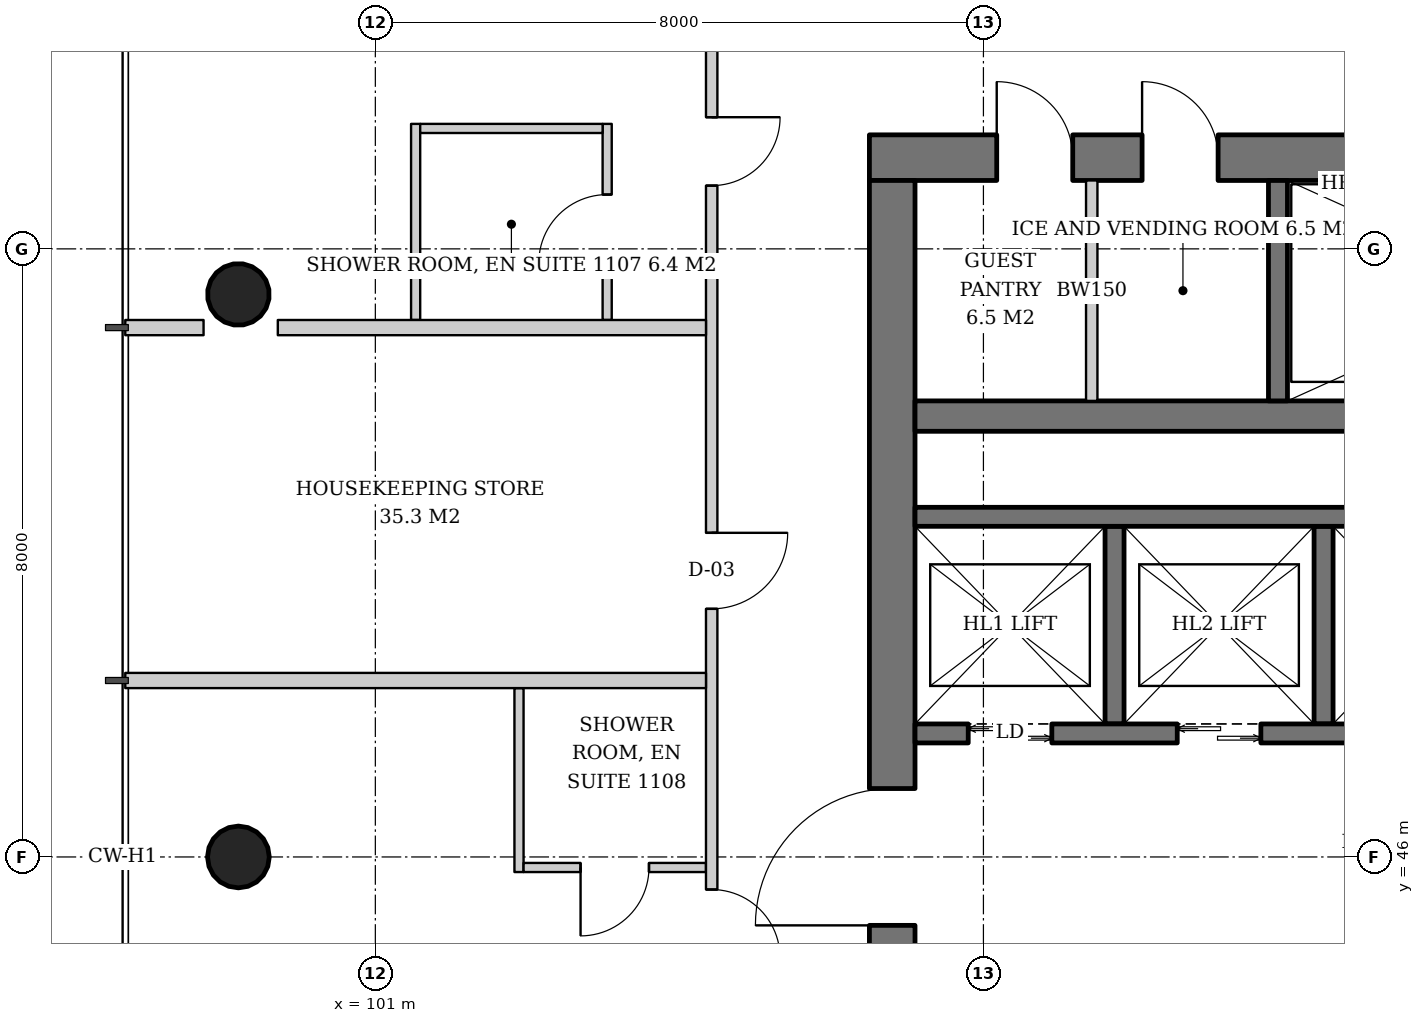
"""IFC4 building model, lengths in metres.
Left out: names, types, materials, properties, quantities, classifications, styles, units other than length and angle.
Written with IfcOpenShell. Run it as: python <this file> out.ifc"""

import sys

from ifc_helpers import new_model, si_unit, direction, frame, frame_2d, origin, origin_2d, place, context, subcontext, project, spatial, rectangle, hollow_circle, extrude, element, fill, save


model = new_model("IFC4")
c1 = context("Model", 3, precision=1e-05, world=origin(), true_north=direction((0.0, 1.0)))
c2 = subcontext(c1, "Body", "Model", "MODEL_VIEW")
j1 = project(units=[si_unit("LENGTHUNIT", "METRE"), si_unit("PLANEANGLEUNIT", "RADIAN")], contexts=[c1])
p1 = place(None, origin())
s1 = spatial("IfcSite", under=j1, at=p1, CompositionType="ELEMENT")
p2 = place(p1, origin())
s2 = spatial("IfcBuilding", under=s1, at=p2, CompositionType="ELEMENT")
p3 = place(p2, frame((0.0, 0.0, 47.6)))
s3 = spatial("IfcBuildingStorey", under=s2, at=p3, CompositionType="ELEMENT", Elevation=47.6)
p4 = place(p3, frame((99.146, 53.427, 0.0), z_axis=(0.043062285527, -0.021563230905, 0.998839660125), x_axis=(0.44774654769, 0.894160516368, 0.0)))
e1 = element("IfcColumn", 1, at=p4, inside=s3, PredefinedType="COLUMN", context=c2, shape_type="SweptSolid", body=[
    extrude(hollow_circle(Radius=0.406, WallThickness=0.03, at=origin_2d()), origin(), (0.0, 0.0, 1.0), 3.804),
])
p5 = place(p3, frame((99.146, 46.0, 0.0), z_axis=(0.043072300418, 0.0, 0.999071957837), x_axis=(0.0, 1.0, 0.0)))
e2 = element("IfcColumn", 2, at=p5, inside=s3, PredefinedType="COLUMN", context=c2, shape_type="SweptSolid", body=[
    extrude(hollow_circle(Radius=0.406, WallThickness=0.03, at=origin_2d()), origin(), (0.0, 0.0, 1.0), 3.803),
])
p6 = place(p3, frame((107.5, 55.2, 0.0), z_axis=(0.0, 0.0, 1.0), x_axis=(1.0, 0.0, 0.0)))
e3 = element("IfcWall", 3, at=p6, inside=s3, PredefinedType="SHEAR", context=c2, shape_type="SweptSolid", body=[
    extrude(rectangle(XDim=19.0, YDim=0.6, at=frame_2d((9.5, 0.0))), origin(), (0.0, 0.0, 1.0), 3.8),
])
p7 = place(p6, frame((14.14, 0.0, 0.0)))
e4 = element("IfcOpeningElement", 4, at=p7, cuts=e3, PredefinedType="OPENING", context=c2, shape_type="SweptSolid", body=[
    extrude(rectangle(XDim=1.0, YDim=2.1, at=frame_2d((0.5, 1.05))), frame((0.0, 0.31, 0.0), z_axis=(0.0, -1.0, 0.0), x_axis=(1.0, 0.0, 0.0)), (0.0, 0.0, 1.0), 0.62),
])
p8 = place(p6, frame((1.675, 0.0, 0.0)))
e5 = element("IfcOpeningElement", 5, at=p8, cuts=e3, PredefinedType="OPENING", context=c2, shape_type="SweptSolid", body=[
    extrude(rectangle(XDim=1.0, YDim=2.1, at=frame_2d((0.5, 1.05))), frame((0.0, 0.31, 0.0), z_axis=(0.0, -1.0, 0.0), x_axis=(1.0, 0.0, 0.0)), (0.0, 0.0, 1.0), 0.62),
])
p9 = place(p6, frame((3.587, 0.0, 0.0)))
e6 = element("IfcOpeningElement", 6, at=p9, cuts=e3, PredefinedType="OPENING", context=c2, shape_type="SweptSolid", body=[
    extrude(rectangle(XDim=1.0, YDim=2.1, at=frame_2d((0.5, 1.05))), frame((0.0, 0.31, 0.0), z_axis=(0.0, -1.0, 0.0), x_axis=(1.0, 0.0, 0.0)), (0.0, 0.0, 1.0), 0.62),
])
p10 = place(p3, frame((107.8, 37.1, 0.0), z_axis=(0.0, 0.0, 1.0), x_axis=(0.0, 1.0, 0.0)))
e7 = element("IfcWall", 7, at=p10, inside=s3, PredefinedType="SHEAR", context=c2, shape_type="SweptSolid", body=[
    extrude(rectangle(XDim=17.8, YDim=0.6, at=frame_2d((8.9, 0.0))), origin(), (0.0, 0.0, 1.0), 3.8),
])
p11 = place(p10, frame((8.0, 0.0, 0.0)))
e8 = element("IfcOpeningElement", 8, at=p11, cuts=e7, PredefinedType="OPENING", context=c2, shape_type="SweptSolid", body=[
    extrude(rectangle(XDim=1.8, YDim=2.4, at=frame_2d((0.9, 1.2))), frame((0.0, 0.31, 0.0), z_axis=(0.0, -1.0, 0.0), x_axis=(1.0, 0.0, 0.0)), (0.0, 0.0, 1.0), 0.62),
])
p12 = place(p3, frame((108.1, 51.8, 0.0), z_axis=(0.0, 0.0, 1.0), x_axis=(1.0, 0.0, 0.0)))
e9 = element("IfcWall", 9, at=p12, inside=s3, PredefinedType="SHEAR", context=c2, shape_type="SweptSolid", body=[
    extrude(rectangle(XDim=17.8, YDim=0.4, at=frame_2d((8.9, 0.0))), origin(), (0.0, 0.0, 1.0), 3.8),
])
p13 = place(p3, frame((112.875, 52.0, 0.0), z_axis=(0.0, 0.0, 1.0), x_axis=(0.0, 1.0, 0.0)))
e10 = element("IfcWall", 10, at=p13, inside=s3, PredefinedType="SHEAR", context=c2, shape_type="SweptSolid", body=[
    extrude(rectangle(XDim=2.9, YDim=0.25, at=frame_2d((1.45, 0.0))), origin(), (0.0, 0.0, 1.0), 3.8),
])
for number, where, z_axis, x_axis in (
    (11, (110.725, 47.75, 0.0), (0.0, 0.0, 1.0), (0.0, 1.0, 0.0)),
    (12, (113.475, 47.75, 0.0), (0.0, 0.0, 1.0), (0.0, 1.0, 0.0)),
):
    element("IfcWall", number, at=place(p3, frame(where, z_axis=z_axis, x_axis=x_axis)), inside=s3, PredefinedType="SHEAR", context=c2, shape_type="SweptSolid", body=[
        extrude(rectangle(XDim=2.6, YDim=0.25, at=frame_2d((1.3, 0.0))), origin(), (0.0, 0.0, 1.0), 3.8),
    ])
p14 = place(p3, frame((108.1, 50.475, 0.0), z_axis=(0.0, 0.0, 1.0), x_axis=(1.0, 0.0, 0.0)))
e13 = element("IfcWall", 13, at=p14, inside=s3, PredefinedType="SHEAR", context=c2, shape_type="SweptSolid", body=[
    extrude(rectangle(XDim=11.0, YDim=0.25, at=frame_2d((5.5, 0.0))), origin(), (0.0, 0.0, 1.0), 3.8),
])
p15 = place(p3, frame((108.1, 47.625, 0.0), z_axis=(0.0, 0.0, 1.0), x_axis=(1.0, 0.0, 0.0)))
e14 = element("IfcWall", 14, at=p15, inside=s3, PredefinedType="SHEAR", context=c2, shape_type="SweptSolid", body=[
    extrude(rectangle(XDim=12.83, YDim=0.25, at=frame_2d((6.415, 0.0))), origin(), (0.0, 0.0, 1.0), 3.8),
])
p16 = place(p15, frame((0.7, 0.0, 0.0)))
e15 = element("IfcOpeningElement", 15, at=p16, cuts=e14, PredefinedType="OPENING", context=c2, shape_type="SweptSolid", body=[
    extrude(rectangle(XDim=1.1, YDim=2.2, at=frame_2d((0.55, 1.1))), frame((0.0, 0.135, 0.0), z_axis=(0.0, -1.0, 0.0), x_axis=(1.0, 0.0, 0.0)), (0.0, 0.0, 1.0), 0.27),
])
p17 = place(p15, frame((3.45, 0.0, 0.0)))
e16 = element("IfcOpeningElement", 16, at=p17, cuts=e14, PredefinedType="OPENING", context=c2, shape_type="SweptSolid", body=[
    extrude(rectangle(XDim=1.1, YDim=2.2, at=frame_2d((0.55, 1.1))), frame((0.0, 0.135, 0.0), z_axis=(0.0, -1.0, 0.0), x_axis=(1.0, 0.0, 0.0)), (0.0, 0.0, 1.0), 0.27),
])
p18 = place(p15, frame((6.2, 0.0, 0.0)))
e17 = element("IfcOpeningElement", 17, at=p18, cuts=e14, PredefinedType="OPENING", context=c2, shape_type="SweptSolid", body=[
    extrude(rectangle(XDim=1.1, YDim=2.2, at=frame_2d((0.55, 1.1))), frame((0.0, 0.135, 0.0), z_axis=(0.0, -1.0, 0.0), x_axis=(1.0, 0.0, 0.0)), (0.0, 0.0, 1.0), 0.27),
])
p19 = place(p15, frame((8.95, 0.0, 0.0)))
e18 = element("IfcOpeningElement", 18, at=p19, cuts=e14, PredefinedType="OPENING", context=c2, shape_type="SweptSolid", body=[
    extrude(rectangle(XDim=1.1, YDim=2.2, at=frame_2d((0.55, 1.1))), frame((0.0, 0.135, 0.0), z_axis=(0.0, -1.0, 0.0), x_axis=(1.0, 0.0, 0.0)), (0.0, 0.0, 1.0), 0.27),
])
p20 = place(p15, frame((11.515, 0.0, 0.0)))
e19 = element("IfcOpeningElement", 19, at=p20, cuts=e14, PredefinedType="OPENING", context=c2, shape_type="SweptSolid", body=[
    extrude(rectangle(XDim=0.8, YDim=2.0, at=frame_2d((0.4, 1.0))), frame((0.0, 0.135, 0.0), z_axis=(0.0, -1.0, 0.0), x_axis=(1.0, 0.0, 0.0)), (0.0, 0.0, 1.0), 0.27),
])
p21 = place(p3, frame((110.425, 52.0, 0.0), z_axis=(0.0, 0.0, 1.0), x_axis=(0.0, 1.0, 0.0)))
e20 = element("IfcWall", 20, at=p21, inside=s3, PredefinedType="SOLIDWALL", context=c2, shape_type="SweptSolid", body=[
    extrude(rectangle(XDim=2.9, YDim=0.15, at=frame_2d((1.45, 0.0))), origin(), (0.0, 0.0, 1.0), 3.6),
])
p22 = place(p3, frame((104.05, 53.064, 0.0), z_axis=(0.0, 0.0, 1.0), x_axis=(0.0, 1.0, 0.0)))
e21 = element("IfcWall", 21, at=p22, inside=s3, PredefinedType="PARTITIONING", context=c2, shape_type="SweptSolid", body=[
    extrude(rectangle(XDim=2.58, YDim=0.12, at=frame_2d((1.29, 0.0))), origin(), (0.0, 0.0, 1.0), 2.8),
])
p23 = place(p22, frame((0.75, 0.0, 0.0)))
e22 = element("IfcOpeningElement", 22, at=p23, cuts=e21, PredefinedType="OPENING", context=c2, shape_type="SweptSolid", body=[
    extrude(rectangle(XDim=0.9, YDim=2.1, at=frame_2d((0.45, 1.05))), frame((0.0, 0.07, 0.0), z_axis=(0.0, -1.0, 0.0), x_axis=(1.0, 0.0, 0.0)), (0.0, 0.0, 1.0), 0.14),
])
p24 = place(p3, frame((101.53, 53.064, 0.0), z_axis=(0.0, 0.0, 1.0), x_axis=(0.0, 1.0, 0.0)))
e23 = element("IfcWall", 23, at=p24, inside=s3, PredefinedType="PARTITIONING", context=c2, shape_type="SweptSolid", body=[
    extrude(rectangle(XDim=2.58, YDim=0.12, at=frame_2d((1.29, 0.0))), origin(), (0.0, 0.0, 1.0), 2.8),
])
p25 = place(p3, frame((103.99, 55.584, 0.0), z_axis=(0.0, 0.0, 1.0), x_axis=(-1.0, 0.0, 0.0)))
e24 = element("IfcWall", 24, at=p25, inside=s3, PredefinedType="PARTITIONING", context=c2, shape_type="SweptSolid", body=[
    extrude(rectangle(XDim=2.4, YDim=0.12, at=frame_2d((1.2, 0.0))), origin(), (0.0, 0.0, 1.0), 2.847),
])
p26 = place(p3, frame((102.89, 48.221, 0.0), z_axis=(0.0, 0.0, 1.0), x_axis=(0.0, -1.0, 0.0)))
e25 = element("IfcWall", 25, at=p26, inside=s3, PredefinedType="PARTITIONING", context=c2, shape_type="SweptSolid", body=[
    extrude(rectangle(XDim=2.42, YDim=0.12, at=frame_2d((1.21, 0.0))), origin(), (0.0, 0.0, 1.0), 2.847),
])
p27 = place(p3, frame((105.35, 45.861, 0.0), z_axis=(0.0, 0.0, 1.0), x_axis=(-1.0, 0.0, 0.0)))
e26 = element("IfcWall", 26, at=p27, inside=s3, PredefinedType="PARTITIONING", context=c2, shape_type="SweptSolid", body=[
    extrude(rectangle(XDim=2.4, YDim=0.12, at=frame_2d((1.2, 0.0))), origin(), (0.0, 0.0, 1.0), 3.6),
])
p28 = place(p27, frame((0.75, 0.0, 0.0)))
e27 = element("IfcOpeningElement", 27, at=p28, cuts=e26, PredefinedType="OPENING", context=c2, shape_type="SweptSolid", body=[
    extrude(rectangle(XDim=0.9, YDim=2.1, at=frame_2d((0.45, 1.05))), frame((0.0, 0.07, 0.0), z_axis=(0.0, -1.0, 0.0), x_axis=(1.0, 0.0, 0.0)), (0.0, 0.0, 1.0), 0.14),
])
p29 = place(p3, frame((105.425, 57.65, 0.0), z_axis=(0.0, 0.0, 1.0), x_axis=(0.0, -1.0, 0.0)))
e28 = element("IfcWall", 28, at=p29, inside=s3, PredefinedType="PARTITIONING", context=c2, shape_type="SweptSolid", body=[
    extrude(rectangle(XDim=23.15, YDim=0.15, at=frame_2d((11.575, 0.0))), origin(), (0.0, 0.0, 1.0), 2.8),
])
p30 = place(p29, frame((1.918, 0.0, 0.0)))
e29 = element("IfcOpeningElement", 29, at=p30, cuts=e28, PredefinedType="OPENING", context=c2, shape_type="SweptSolid", body=[
    extrude(rectangle(XDim=0.9, YDim=2.1, at=frame_2d((0.45, 1.05))), frame((0.0, 0.085, 0.0), z_axis=(0.0, -1.0, 0.0), x_axis=(1.0, 0.0, 0.0)), (0.0, 0.0, 1.0), 0.17),
])
p31 = place(p29, frame((7.386, 0.0, 0.0)))
e30 = element("IfcOpeningElement", 30, at=p31, cuts=e28, PredefinedType="OPENING", context=c2, shape_type="SweptSolid", body=[
    extrude(rectangle(XDim=1.0, YDim=2.1, at=frame_2d((0.5, 1.05))), frame((0.0, 0.085, 0.0), z_axis=(0.0, -1.0, 0.0), x_axis=(1.0, 0.0, 0.0)), (0.0, 0.0, 1.0), 0.17),
])
p32 = place(p29, frame((12.079, 0.0, 0.0)))
e31 = element("IfcOpeningElement", 31, at=p32, cuts=e28, PredefinedType="OPENING", context=c2, shape_type="SweptSolid", body=[
    extrude(rectangle(XDim=0.9, YDim=2.1, at=frame_2d((0.45, 1.05))), frame((0.0, 0.085, 0.0), z_axis=(0.0, -1.0, 0.0), x_axis=(1.0, 0.0, 0.0)), (0.0, 0.0, 1.0), 0.17),
])
p33 = place(p3, frame((105.35, 52.964, 0.0), z_axis=(0.0, 0.0, 1.0), x_axis=(-1.0, 0.0, 0.0)))
e32 = element("IfcWall", 32, at=p33, inside=s3, PredefinedType="PARTITIONING", context=c2, shape_type="SweptSolid", body=[
    extrude(rectangle(XDim=5.633, YDim=0.2, at=frame_2d((2.817, 0.0))), origin(), (0.0, 0.0, 1.0), 3.6),
])
p34 = place(p3, frame((98.74, 52.964, 0.0), z_axis=(0.0, 0.0, 1.0), x_axis=(-1.0, 0.0, 0.0)))
e33 = element("IfcWall", 33, at=p34, inside=s3, PredefinedType="PARTITIONING", context=c2, shape_type="SweptSolid", body=[
    extrude(rectangle(XDim=1.03, YDim=0.2, at=frame_2d((0.515, 0.0))), origin(), (0.0, 0.0, 1.0), 3.6),
])
p35 = place(p3, frame((105.35, 48.322, 0.0), z_axis=(0.0, 0.0, 1.0), x_axis=(-1.0, 0.0, 0.0)))
e34 = element("IfcWall", 34, at=p35, inside=s3, PredefinedType="PARTITIONING", context=c2, shape_type="SweptSolid", body=[
    extrude(rectangle(XDim=7.64, YDim=0.2, at=frame_2d((3.82, 0.0))), origin(), (0.0, 0.0, 1.0), 3.05),
])
p36 = place(p16, origin())
e35 = element("IfcDoor", 35, at=p36, inside=s3, OperationType="DOUBLE_DOOR_SLIDING", PredefinedType="DOOR", context=c2, shape_type="SweptSolid", body=[
    extrude(rectangle(XDim=1.1, YDim=2.2, at=frame_2d((0.55, 1.1))), frame((0.0, 0.025, 0.0), z_axis=(0.0, -1.0, 0.0), x_axis=(1.0, 0.0, 0.0)), (0.0, 0.0, 1.0), 0.05),
])
fill(e15, e35)
p37 = place(p17, origin())
e36 = element("IfcDoor", 36, at=p37, inside=s3, OperationType="DOUBLE_DOOR_SLIDING", PredefinedType="DOOR", context=c2, shape_type="SweptSolid", body=[
    extrude(rectangle(XDim=1.1, YDim=2.2, at=frame_2d((0.55, 1.1))), frame((0.0, 0.025, 0.0), z_axis=(0.0, -1.0, 0.0), x_axis=(1.0, 0.0, 0.0)), (0.0, 0.0, 1.0), 0.05),
])
fill(e16, e36)
p38 = place(p11, origin())
e37 = element("IfcDoor", 37, at=p38, inside=s3, OperationType="DOUBLE_DOOR_SINGLE_SWING", PredefinedType="DOOR", context=c2, shape_type="SweptSolid", body=[
    extrude(rectangle(XDim=1.8, YDim=2.4, at=frame_2d((0.9, 1.2))), frame((0.0, 0.025, 0.0), z_axis=(0.0, -1.0, 0.0), x_axis=(1.0, 0.0, 0.0)), (0.0, 0.0, 1.0), 0.05),
])
fill(e8, e37)
p39 = place(p8, origin())
e38 = element("IfcDoor", 38, at=p39, inside=s3, OperationType="SINGLE_SWING_LEFT", PredefinedType="DOOR", context=c2, shape_type="SweptSolid", body=[
    extrude(rectangle(XDim=1.0, YDim=2.1, at=frame_2d((0.5, 1.05))), frame((0.0, -0.24, 0.0), z_axis=(0.0, -1.0, 0.0), x_axis=(1.0, 0.0, 0.0)), (0.0, 0.0, 1.0), 0.05),
])
fill(e5, e38)
p40 = place(p9, origin())
e39 = element("IfcDoor", 39, at=p40, inside=s3, OperationType="SINGLE_SWING_LEFT", PredefinedType="DOOR", context=c2, shape_type="SweptSolid", body=[
    extrude(rectangle(XDim=1.0, YDim=2.1, at=frame_2d((0.5, 1.05))), frame((0.0, -0.24, 0.0), z_axis=(0.0, -1.0, 0.0), x_axis=(1.0, 0.0, 0.0)), (0.0, 0.0, 1.0), 0.05),
])
fill(e6, e39)
p41 = place(p23, origin())
e40 = element("IfcDoor", 40, at=p41, inside=s3, OperationType="SINGLE_SWING_LEFT", PredefinedType="DOOR", context=c2, shape_type="SweptSolid", body=[
    extrude(rectangle(XDim=0.9, YDim=2.1, at=frame_2d((0.45, 1.05))), frame((0.0, 0.025, 0.0), z_axis=(0.0, -1.0, 0.0), x_axis=(1.0, 0.0, 0.0)), (0.0, 0.0, 1.0), 0.05),
])
fill(e22, e40)
p42 = place(p28, origin())
e41 = element("IfcDoor", 41, at=p42, inside=s3, OperationType="SINGLE_SWING_RIGHT", PredefinedType="DOOR", context=c2, shape_type="SweptSolid", body=[
    extrude(rectangle(XDim=0.9, YDim=2.1, at=frame_2d((0.45, 1.05))), frame((0.0, 0.025, 0.0), z_axis=(0.0, -1.0, 0.0), x_axis=(1.0, 0.0, 0.0)), (0.0, 0.0, 1.0), 0.05),
])
fill(e27, e41)
p43 = place(p30, origin())
e42 = element("IfcDoor", 42, at=p43, inside=s3, OperationType="SINGLE_SWING_LEFT", PredefinedType="DOOR", context=c2, shape_type="SweptSolid", body=[
    extrude(rectangle(XDim=0.9, YDim=2.1, at=frame_2d((0.45, 1.05))), frame((0.0, 0.025, 0.0), z_axis=(0.0, -1.0, 0.0), x_axis=(1.0, 0.0, 0.0)), (0.0, 0.0, 1.0), 0.05),
])
fill(e29, e42)
p44 = place(p31, origin())
e43 = element("IfcDoor", 43, at=p44, inside=s3, OperationType="SINGLE_SWING_LEFT", PredefinedType="DOOR", context=c2, shape_type="SweptSolid", body=[
    extrude(rectangle(XDim=1.0, YDim=2.1, at=frame_2d((0.5, 1.05))), frame((0.0, 0.025, 0.0), z_axis=(0.0, -1.0, 0.0), x_axis=(1.0, 0.0, 0.0)), (0.0, 0.0, 1.0), 0.05),
])
fill(e30, e43)
p45 = place(p32, origin())
e44 = element("IfcDoor", 44, at=p45, inside=s3, OperationType="SINGLE_SWING_RIGHT", PredefinedType="DOOR", context=c2, shape_type="SweptSolid", body=[
    extrude(rectangle(XDim=0.9, YDim=2.1, at=frame_2d((0.45, 1.05))), frame((0.0, 0.025, 0.0), z_axis=(0.0, -1.0, 0.0), x_axis=(1.0, 0.0, 0.0)), (0.0, 0.0, 1.0), 0.05),
])
fill(e31, e44)
save(model, sys.argv[1])
